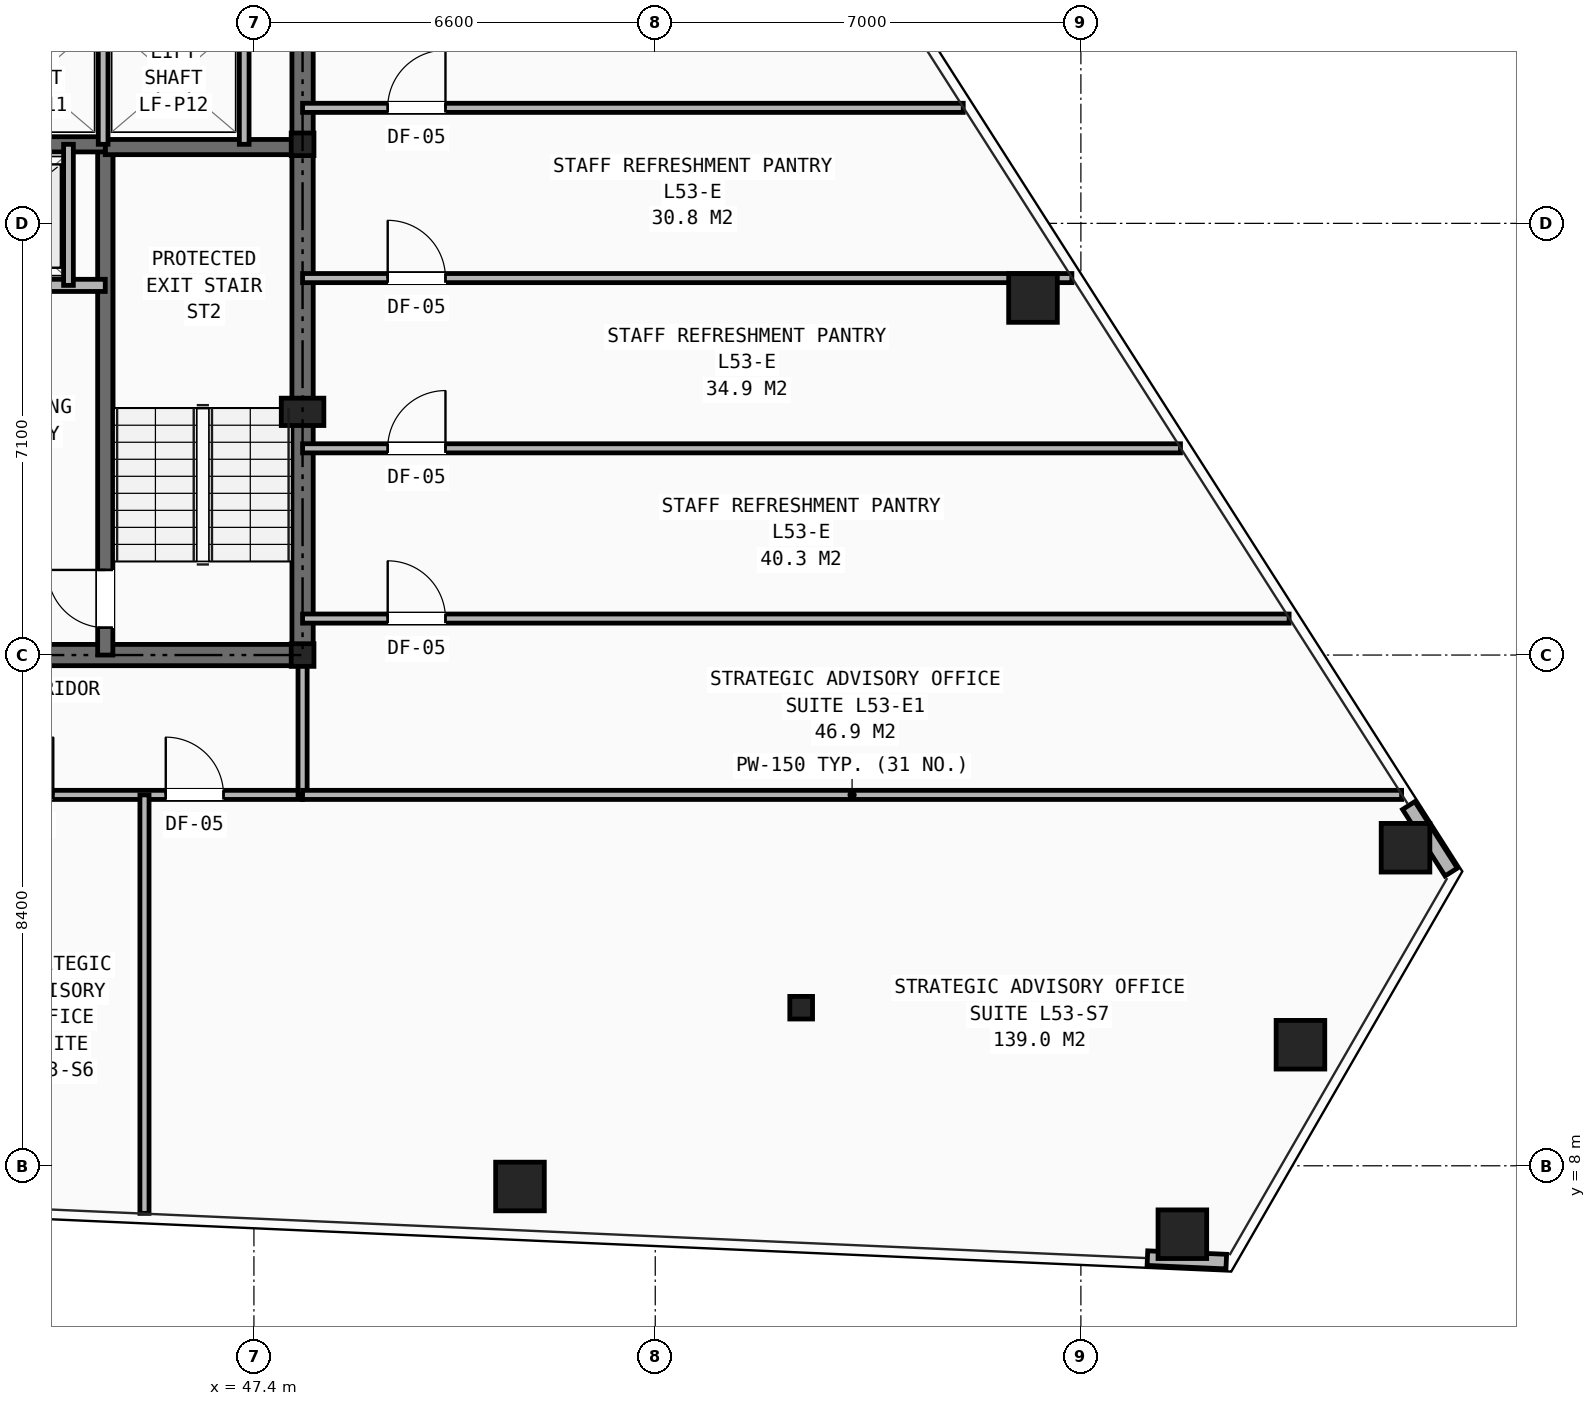
"""IFC4 building model, lengths in metres.
Left out: names, types, materials, properties, quantities, classifications, styles, units other than length and angle.
Written with IfcOpenShell. Run it as: python <this file> out.ifc"""

import sys

from ifc_helpers import new_model, si_unit, direction, frame, frame_2d, origin, origin_2d, place, context, subcontext, project, spatial, rectangle, hollow_rectangle, i_section, extrude, element, fill, save


model = new_model("IFC4")
c1 = context("Model", 3, precision=1e-05, world=origin(), true_north=direction((0.0, 1.0)))
c2 = subcontext(c1, "Body", "Model", "MODEL_VIEW")
j1 = project(units=[si_unit("LENGTHUNIT", "METRE"), si_unit("PLANEANGLEUNIT", "RADIAN")], contexts=[c1])
p1 = place(None, origin())
s1 = spatial("IfcSite", under=j1, at=p1, CompositionType="ELEMENT")
p2 = place(p1, origin())
s2 = spatial("IfcBuilding", under=s1, at=p2, CompositionType="ELEMENT")
p3 = place(p2, frame((0.0, 0.0, 186.15)))
s3 = spatial("IfcBuildingStorey", under=s2, at=p3, CompositionType="ELEMENT", Elevation=186.15)
for number, where, z_axis, x_axis in (
    (1, (48.2, 16.4, 0.0), (0.0, 0.0, 1.0), (1.0, 0.0, 0.0)),
    (2, (48.2, 24.8, 0.0), (0.0, 0.0, 1.0), (1.0, 0.0, 0.0)),
    (3, (56.4, 10.6, 0.0), (0.0, 0.0, 1.0), (1.0, 0.0, 0.0)),
):
    element("IfcColumn", number, at=place(p3, frame(where, z_axis=z_axis, x_axis=x_axis)), inside=s3, PredefinedType="COLUMN", context=c2, shape_type="SweptSolid", body=[
        extrude(i_section(OverallWidth=0.374, OverallDepth=0.372, WebThickness=0.016, FlangeThickness=0.026, at=origin_2d()), origin(), (0.0, 0.0, 1.0), 3.45),
    ])
p4 = place(p3, frame((48.2, 20.4, 0.0), z_axis=(0.0, 0.0, 1.0), x_axis=(1.0, 0.0, 0.0)))
e4 = element("IfcColumn", 4, at=p4, inside=s3, PredefinedType="PILASTER", context=c2, shape_type="SweptSolid", body=[
    extrude(rectangle(XDim=0.7, YDim=0.45, at=origin_2d()), origin(), (0.0, 0.0, 1.0), 3.45),
])
for number, where, z_axis, x_axis in (
    (5, (51.775, 7.659, 0.0), (0.0, 0.0, 1.0), (1.0, 0.0, 0.0)),
    (6, (62.669, 6.875, 0.0), (0.0, 0.0, 1.0), (1.0, 0.0, 0.0)),
    (7, (64.611, 9.991, 0.0), (0.0, 0.0, 1.0), (1.0, 0.0, 0.0)),
    (8, (66.339, 13.231, 0.0), (0.0, 0.0, 1.0), (1.0, 0.0, 0.0)),
    (9, (60.212, 22.272, 0.0), (0.0, 0.0, 1.0), (1.0, 0.0, 0.0)),
):
    element("IfcColumn", number, at=place(p3, frame(where, z_axis=z_axis, x_axis=x_axis)), inside=s3, PredefinedType="COLUMN", context=c2, shape_type="SweptSolid", body=[
        extrude(hollow_rectangle(XDim=0.8, YDim=0.8, WallThickness=0.055, at=origin_2d()), origin(), (0.0, 0.0, 1.0), 3.45),
    ])
for number, where, z_axis, x_axis in (
    (10, (62.094, 6.481, 0.0), (0.0, 0.0, 1.0), (0.999, -0.044, 0.0)),
    (11, (67.09, 12.831, 0.0), (0.0, 0.0, 1.0), (-0.538, 0.843, 0.0)),
):
    element("IfcWall", number, at=place(p3, frame(where, z_axis=z_axis, x_axis=x_axis)), inside=s3, PredefinedType="SHEAR", context=c2, shape_type="SweptSolid", body=[
        extrude(rectangle(XDim=1.298, YDim=0.24, at=frame_2d((0.649, 0.0))), origin(), (0.0, 0.0, 1.0), 2.583),
    ])
p5 = place(p3, frame((31.8, 16.4, 0.0), z_axis=(0.0, 0.0, 1.0), x_axis=(1.0, 0.0, 0.0)))
e12 = element("IfcWall", 12, at=p5, inside=s3, PredefinedType="SHEAR", context=c2, shape_type="SweptSolid", body=[
    extrude(rectangle(XDim=16.4, YDim=0.35, at=frame_2d((8.2, 0.0))), origin(), (0.0, 0.0, 1.0), 3.21),
])
p6 = place(p5, frame((7.75, 0.0, 0.0)))
e13 = element("IfcOpeningElement", 13, at=p6, cuts=e12, PredefinedType="OPENING", context=c2, shape_type="SweptSolid", body=[
    extrude(rectangle(XDim=0.9, YDim=2.1, at=frame_2d((0.45, 1.05))), frame((0.0, 0.185, 0.0), z_axis=(0.0, -1.0, 0.0), x_axis=(1.0, 0.0, 0.0)), (0.0, 0.0, 1.0), 0.37),
])
p7 = place(p5, frame((4.2, 0.0, 0.0)))
e14 = element("IfcOpeningElement", 14, at=p7, cuts=e12, PredefinedType="OPENING", context=c2, shape_type="SweptSolid", body=[
    extrude(rectangle(XDim=0.95, YDim=2.1, at=frame_2d((0.475, 1.05))), frame((0.0, 0.185, 0.0), z_axis=(0.0, -1.0, 0.0), x_axis=(1.0, 0.0, 0.0)), (0.0, 0.0, 1.0), 0.37),
])
p8 = place(p5, frame((10.6, 0.0, 0.0)))
e15 = element("IfcOpeningElement", 15, at=p8, cuts=e12, PredefinedType="OPENING", context=c2, shape_type="SweptSolid", body=[
    extrude(rectangle(XDim=0.95, YDim=2.1, at=frame_2d((0.475, 1.05))), frame((0.0, 0.185, 0.0), z_axis=(0.0, -1.0, 0.0), x_axis=(1.0, 0.0, 0.0)), (0.0, 0.0, 1.0), 0.37),
])
p9 = place(p3, frame((48.2, 16.4, 0.0), z_axis=(0.0, 0.0, 1.0), x_axis=(0.0, 1.0, 0.0)))
e16 = element("IfcWall", 16, at=p9, inside=s3, PredefinedType="SHEAR", context=c2, shape_type="SweptSolid", body=[
    extrude(rectangle(XDim=14.8, YDim=0.35, at=frame_2d((7.4, 0.0))), origin(), (0.0, 0.0, 1.0), 3.21),
])
p10 = place(p9, frame((11.0, 0.0, 0.0)))
e17 = element("IfcOpeningElement", 17, at=p10, cuts=e16, PredefinedType="OPENING", context=c2, shape_type="SweptSolid", body=[
    extrude(rectangle(XDim=1.1, YDim=2.15, at=frame_2d((0.55, 1.075))), frame((0.0, 0.185, 0.0), z_axis=(0.0, -1.0, 0.0), x_axis=(1.0, 0.0, 0.0)), (0.0, 0.0, 1.0), 0.37),
])
p11 = place(p3, frame((44.955, 16.4, 0.0), z_axis=(0.0, 0.0, 1.0), x_axis=(0.0, 1.0, 0.0)))
e18 = element("IfcWall", 18, at=p11, inside=s3, PredefinedType="SHEAR", context=c2, shape_type="SweptSolid", body=[
    extrude(rectangle(XDim=8.4, YDim=0.25, at=frame_2d((4.2, 0.0))), origin(), (0.0, 0.0, 1.0), 3.21),
])
p12 = place(p11, frame((0.45, 0.0, 0.0)))
e19 = element("IfcOpeningElement", 19, at=p12, cuts=e18, PredefinedType="OPENING", context=c2, shape_type="SweptSolid", body=[
    extrude(rectangle(XDim=0.95, YDim=2.1, at=frame_2d((0.475, 1.05))), frame((0.0, 0.135, 0.0), z_axis=(0.0, -1.0, 0.0), x_axis=(1.0, 0.0, 0.0)), (0.0, 0.0, 1.0), 0.27),
])
p13 = place(p3, frame((44.955, 24.755, 0.0), z_axis=(0.0, 0.0, 1.0), x_axis=(1.0, 0.0, 0.0)))
e20 = element("IfcWall", 20, at=p13, inside=s3, PredefinedType="SHEAR", context=c2, shape_type="SweptSolid", body=[
    extrude(rectangle(XDim=3.245, YDim=0.25, at=frame_2d((1.623, 0.0))), origin(), (0.0, 0.0, 1.0), 3.21),
])
p14 = place(p3, frame((35.045, 24.8, 0.0), z_axis=(0.0, 0.0, 1.0), x_axis=(1.0, 0.0, 0.0)))
e21 = element("IfcWall", 21, at=p14, inside=s3, PredefinedType="SHEAR", context=c2, shape_type="SweptSolid", body=[
    extrude(rectangle(XDim=9.91, YDim=0.25, at=frame_2d((4.955, 0.0))), origin(), (0.0, 0.0, 1.0), 3.21),
])
p15 = place(p3, frame((35.045, 22.48, 0.0), z_axis=(0.0, 0.0, 1.0), x_axis=(1.0, 0.0, 0.0)))
e22 = element("IfcWall", 22, at=p15, inside=s3, PredefinedType="SOLIDWALL", context=c2, shape_type="SweptSolid", body=[
    extrude(rectangle(XDim=9.91, YDim=0.2, at=frame_2d((4.955, 0.0))), origin(), (0.0, 0.0, 1.0), 3.21),
])
p16 = place(p15, frame((1.255, 0.0, 0.0)))
e23 = element("IfcOpeningElement", 23, at=p16, cuts=e22, PredefinedType="OPENING", context=c2, shape_type="SweptSolid", body=[
    extrude(rectangle(XDim=1.1, YDim=2.15, at=frame_2d((0.55, 1.075))), frame((0.0, 0.11, 0.0), z_axis=(0.0, -1.0, 0.0), x_axis=(1.0, 0.0, 0.0)), (0.0, 0.0, 1.0), 0.22),
])
p17 = place(p15, frame((7.555, 0.0, 0.0)))
e24 = element("IfcOpeningElement", 24, at=p17, cuts=e22, PredefinedType="OPENING", context=c2, shape_type="SweptSolid", body=[
    extrude(rectangle(XDim=1.1, YDim=2.15, at=frame_2d((0.55, 1.075))), frame((0.0, 0.11, 0.0), z_axis=(0.0, -1.0, 0.0), x_axis=(1.0, 0.0, 0.0)), (0.0, 0.0, 1.0), 0.22),
])
p18 = place(p15, frame((4.405, 0.0, 0.0)))
e25 = element("IfcOpeningElement", 25, at=p18, cuts=e22, PredefinedType="OPENING", context=c2, shape_type="SweptSolid", body=[
    extrude(rectangle(XDim=1.1, YDim=2.15, at=frame_2d((0.55, 1.075))), frame((0.0, 0.11, 0.0), z_axis=(0.0, -1.0, 0.0), x_axis=(1.0, 0.0, 0.0)), (0.0, 0.0, 1.0), 0.22),
])
p19 = place(p3, frame((44.35, 22.48, 0.0), z_axis=(0.0, 0.0, 1.0), x_axis=(0.0, 1.0, 0.0)))
e26 = element("IfcWall", 26, at=p19, inside=s3, PredefinedType="SOLIDWALL", context=c2, shape_type="SweptSolid", body=[
    extrude(rectangle(XDim=2.32, YDim=0.16, at=frame_2d((1.16, 0.0))), origin(), (0.0, 0.0, 1.0), 3.21),
])
for number, where, z_axis, x_axis in (
    (27, (44.92, 24.8, 0.0), (0.0, 0.0, 1.0), (0.0, 1.0, 0.0)),
    (28, (47.24, 24.8, 0.0), (0.0, 0.0, 1.0), (0.0, 1.0, 0.0)),
):
    element("IfcWall", number, at=place(p3, frame(where, z_axis=z_axis, x_axis=x_axis)), inside=s3, PredefinedType="SOLIDWALL", context=c2, shape_type="SweptSolid", body=[
        extrude(rectangle(XDim=2.08, YDim=0.16, at=frame_2d((1.04, 0.0))), origin(), (0.0, 0.0, 1.0), 3.21),
    ])
p20 = place(p3, frame((29.6, 14.1, 0.0), z_axis=(0.0, 0.0, 1.0), x_axis=(1.0, 0.0, 0.0)))
e29 = element("IfcWall", 29, at=p20, inside=s3, PredefinedType="PARTITIONING", context=c2, shape_type="SweptSolid", body=[
    extrude(rectangle(XDim=18.6, YDim=0.15, at=frame_2d((9.3, 0.0))), origin(), (0.0, 0.0, 1.0), 2.252),
])
p21 = place(p20, frame((0.55, 0.0, 0.0)))
e30 = element("IfcOpeningElement", 30, at=p21, cuts=e29, PredefinedType="OPENING", context=c2, shape_type="SweptSolid", body=[
    extrude(rectangle(XDim=0.95, YDim=2.1, at=frame_2d((0.475, 1.05))), frame((0.0, 0.085, 0.0), z_axis=(0.0, -1.0, 0.0), x_axis=(1.0, 0.0, 0.0)), (0.0, 0.0, 1.0), 0.17),
])
p22 = place(p20, frame((2.35, 0.0, 0.0)))
e31 = element("IfcOpeningElement", 31, at=p22, cuts=e29, PredefinedType="OPENING", context=c2, shape_type="SweptSolid", body=[
    extrude(rectangle(XDim=0.95, YDim=2.1, at=frame_2d((0.475, 1.05))), frame((0.0, 0.085, 0.0), z_axis=(0.0, -1.0, 0.0), x_axis=(1.0, 0.0, 0.0)), (0.0, 0.0, 1.0), 0.17),
])
p23 = place(p20, frame((5.15, 0.0, 0.0)))
e32 = element("IfcOpeningElement", 32, at=p23, cuts=e29, PredefinedType="OPENING", context=c2, shape_type="SweptSolid", body=[
    extrude(rectangle(XDim=0.95, YDim=2.1, at=frame_2d((0.475, 1.05))), frame((0.0, 0.085, 0.0), z_axis=(0.0, -1.0, 0.0), x_axis=(1.0, 0.0, 0.0)), (0.0, 0.0, 1.0), 0.17),
])
p24 = place(p20, frame((7.95, 0.0, 0.0)))
e33 = element("IfcOpeningElement", 33, at=p24, cuts=e29, PredefinedType="OPENING", context=c2, shape_type="SweptSolid", body=[
    extrude(rectangle(XDim=0.95, YDim=2.1, at=frame_2d((0.475, 1.05))), frame((0.0, 0.085, 0.0), z_axis=(0.0, -1.0, 0.0), x_axis=(1.0, 0.0, 0.0)), (0.0, 0.0, 1.0), 0.17),
])
p25 = place(p20, frame((10.75, 0.0, 0.0)))
e34 = element("IfcOpeningElement", 34, at=p25, cuts=e29, PredefinedType="OPENING", context=c2, shape_type="SweptSolid", body=[
    extrude(rectangle(XDim=0.95, YDim=2.1, at=frame_2d((0.475, 1.05))), frame((0.0, 0.085, 0.0), z_axis=(0.0, -1.0, 0.0), x_axis=(1.0, 0.0, 0.0)), (0.0, 0.0, 1.0), 0.17),
])
p26 = place(p20, frame((13.55, 0.0, 0.0)))
e35 = element("IfcOpeningElement", 35, at=p26, cuts=e29, PredefinedType="OPENING", context=c2, shape_type="SweptSolid", body=[
    extrude(rectangle(XDim=0.95, YDim=2.1, at=frame_2d((0.475, 1.05))), frame((0.0, 0.085, 0.0), z_axis=(0.0, -1.0, 0.0), x_axis=(1.0, 0.0, 0.0)), (0.0, 0.0, 1.0), 0.17),
])
p27 = place(p20, frame((16.35, 0.0, 0.0)))
e36 = element("IfcOpeningElement", 36, at=p27, cuts=e29, PredefinedType="OPENING", context=c2, shape_type="SweptSolid", body=[
    extrude(rectangle(XDim=0.95, YDim=2.1, at=frame_2d((0.475, 1.05))), frame((0.0, 0.085, 0.0), z_axis=(0.0, -1.0, 0.0), x_axis=(1.0, 0.0, 0.0)), (0.0, 0.0, 1.0), 0.17),
])
p28 = place(p3, frame((48.2, 14.1, 0.0), z_axis=(0.0, 0.0, 1.0), x_axis=(0.0, 1.0, 0.0)))
e37 = element("IfcWall", 37, at=p28, inside=s3, PredefinedType="PARTITIONING", context=c2, shape_type="SweptSolid", body=[
    extrude(rectangle(XDim=2.3, YDim=0.15, at=frame_2d((1.15, 0.0))), origin(), (0.0, 0.0, 1.0), 2.665),
])
p29 = place(p3, frame((45.6, 7.217, 0.0), z_axis=(0.0, 0.0, 1.0), x_axis=(0.0, 1.0, 0.0)))
e38 = element("IfcWall", 38, at=p29, inside=s3, PredefinedType="PARTITIONING", context=c2, shape_type="SweptSolid", body=[
    extrude(rectangle(XDim=6.883, YDim=0.15, at=frame_2d((3.441, 0.0))), origin(), (0.0, 0.0, 1.0), 2.589),
])
p30 = place(p3, frame((48.2, 14.1, 0.0), z_axis=(0.0, 0.0, 1.0), x_axis=(1.0, 0.0, 0.0)))
e39 = element("IfcWall", 39, at=p30, inside=s3, PredefinedType="PARTITIONING", context=c2, shape_type="SweptSolid", body=[
    extrude(rectangle(XDim=18.074, YDim=0.15, at=frame_2d((9.037, 0.0))), origin(), (0.0, 0.0, 1.0), 2.589),
])
p31 = place(p3, frame((48.2, 17.0, 0.0), z_axis=(0.0, 0.0, 1.0), x_axis=(1.0, 0.0, 0.0)))
e40 = element("IfcWall", 40, at=p31, inside=s3, PredefinedType="PARTITIONING", context=c2, shape_type="SweptSolid", body=[
    extrude(rectangle(XDim=16.224, YDim=0.15, at=frame_2d((8.112, 0.0))), origin(), (0.0, 0.0, 1.0), 2.589),
])
p32 = place(p31, frame((1.4, 0.0, 0.0)))
e41 = element("IfcOpeningElement", 41, at=p32, cuts=e40, PredefinedType="OPENING", context=c2, shape_type="SweptSolid", body=[
    extrude(rectangle(XDim=0.95, YDim=2.1, at=frame_2d((0.475, 1.05))), frame((0.0, 0.085, 0.0), z_axis=(0.0, -1.0, 0.0), x_axis=(1.0, 0.0, 0.0)), (0.0, 0.0, 1.0), 0.17),
])
p33 = place(p3, frame((48.2, 19.8, 0.0), z_axis=(0.0, 0.0, 1.0), x_axis=(1.0, 0.0, 0.0)))
e42 = element("IfcWall", 42, at=p33, inside=s3, PredefinedType="PARTITIONING", context=c2, shape_type="SweptSolid", body=[
    extrude(rectangle(XDim=14.438, YDim=0.15, at=frame_2d((7.219, 0.0))), origin(), (0.0, 0.0, 1.0), 2.589),
])
p34 = place(p33, frame((1.4, 0.0, 0.0)))
e43 = element("IfcOpeningElement", 43, at=p34, cuts=e42, PredefinedType="OPENING", context=c2, shape_type="SweptSolid", body=[
    extrude(rectangle(XDim=0.95, YDim=2.1, at=frame_2d((0.475, 1.05))), frame((0.0, 0.085, 0.0), z_axis=(0.0, -1.0, 0.0), x_axis=(1.0, 0.0, 0.0)), (0.0, 0.0, 1.0), 0.17),
])
p35 = place(p3, frame((48.2, 22.6, 0.0), z_axis=(0.0, 0.0, 1.0), x_axis=(1.0, 0.0, 0.0)))
e44 = element("IfcWall", 44, at=p35, inside=s3, PredefinedType="PARTITIONING", context=c2, shape_type="SweptSolid", body=[
    extrude(rectangle(XDim=12.652, YDim=0.15, at=frame_2d((6.326, 0.0))), origin(), (0.0, 0.0, 1.0), 2.589),
])
p36 = place(p35, frame((1.4, 0.0, 0.0)))
e45 = element("IfcOpeningElement", 45, at=p36, cuts=e44, PredefinedType="OPENING", context=c2, shape_type="SweptSolid", body=[
    extrude(rectangle(XDim=0.95, YDim=2.1, at=frame_2d((0.475, 1.05))), frame((0.0, 0.085, 0.0), z_axis=(0.0, -1.0, 0.0), x_axis=(1.0, 0.0, 0.0)), (0.0, 0.0, 1.0), 0.17),
])
p37 = place(p3, frame((48.2, 25.4, 0.0), z_axis=(0.0, 0.0, 1.0), x_axis=(1.0, 0.0, 0.0)))
e46 = element("IfcWall", 46, at=p37, inside=s3, PredefinedType="PARTITIONING", context=c2, shape_type="SweptSolid", body=[
    extrude(rectangle(XDim=10.865, YDim=0.15, at=frame_2d((5.433, 0.0))), origin(), (0.0, 0.0, 1.0), 2.589),
])
p38 = place(p37, frame((1.4, 0.0, 0.0)))
e47 = element("IfcOpeningElement", 47, at=p38, cuts=e46, PredefinedType="OPENING", context=c2, shape_type="SweptSolid", body=[
    extrude(rectangle(XDim=0.95, YDim=2.1, at=frame_2d((0.475, 1.05))), frame((0.0, 0.085, 0.0), z_axis=(0.0, -1.0, 0.0), x_axis=(1.0, 0.0, 0.0)), (0.0, 0.0, 1.0), 0.17),
])
p39 = place(p12, origin())
e48 = element("IfcDoor", 48, at=p39, inside=s3, OperationType="SINGLE_SWING_RIGHT", PredefinedType="DOOR", context=c2, shape_type="SweptSolid", body=[
    extrude(rectangle(XDim=0.95, YDim=2.1, at=frame_2d((0.475, 1.05))), frame((0.0, 0.025, 0.0), z_axis=(0.0, -1.0, 0.0), x_axis=(1.0, 0.0, 0.0)), (0.0, 0.0, 1.0), 0.05),
])
fill(e19, e48)
p40 = place(p26, origin())
e49 = element("IfcDoor", 49, at=p40, inside=s3, OperationType="SINGLE_SWING_RIGHT", PredefinedType="DOOR", context=c2, shape_type="SweptSolid", body=[
    extrude(rectangle(XDim=0.95, YDim=2.1, at=frame_2d((0.475, 1.05))), frame((0.0, 0.025, 0.0), z_axis=(0.0, -1.0, 0.0), x_axis=(1.0, 0.0, 0.0)), (0.0, 0.0, 1.0), 0.05),
])
fill(e35, e49)
p41 = place(p27, origin())
e50 = element("IfcDoor", 50, at=p41, inside=s3, OperationType="SINGLE_SWING_LEFT", PredefinedType="DOOR", context=c2, shape_type="SweptSolid", body=[
    extrude(rectangle(XDim=0.95, YDim=2.1, at=frame_2d((0.475, 1.05))), frame((0.0, 0.025, 0.0), z_axis=(0.0, -1.0, 0.0), x_axis=(1.0, 0.0, 0.0)), (0.0, 0.0, 1.0), 0.05),
])
fill(e36, e50)
p42 = place(p32, origin())
e51 = element("IfcDoor", 51, at=p42, inside=s3, OperationType="SINGLE_SWING_LEFT", PredefinedType="DOOR", context=c2, shape_type="SweptSolid", body=[
    extrude(rectangle(XDim=0.95, YDim=2.1, at=frame_2d((0.475, 1.05))), frame((0.0, 0.025, 0.0), z_axis=(0.0, -1.0, 0.0), x_axis=(1.0, 0.0, 0.0)), (0.0, 0.0, 1.0), 0.05),
])
fill(e41, e51)
p43 = place(p34, origin())
e52 = element("IfcDoor", 52, at=p43, inside=s3, OperationType="SINGLE_SWING_RIGHT", PredefinedType="DOOR", context=c2, shape_type="SweptSolid", body=[
    extrude(rectangle(XDim=0.95, YDim=2.1, at=frame_2d((0.475, 1.05))), frame((0.0, 0.025, 0.0), z_axis=(0.0, -1.0, 0.0), x_axis=(1.0, 0.0, 0.0)), (0.0, 0.0, 1.0), 0.05),
])
fill(e43, e52)
p44 = place(p36, origin())
e53 = element("IfcDoor", 53, at=p44, inside=s3, OperationType="SINGLE_SWING_LEFT", PredefinedType="DOOR", context=c2, shape_type="SweptSolid", body=[
    extrude(rectangle(XDim=0.95, YDim=2.1, at=frame_2d((0.475, 1.05))), frame((0.0, 0.025, 0.0), z_axis=(0.0, -1.0, 0.0), x_axis=(1.0, 0.0, 0.0)), (0.0, 0.0, 1.0), 0.05),
])
fill(e45, e53)
p45 = place(p38, origin())
e54 = element("IfcDoor", 54, at=p45, inside=s3, OperationType="SINGLE_SWING_RIGHT", PredefinedType="DOOR", context=c2, shape_type="SweptSolid", body=[
    extrude(rectangle(XDim=0.95, YDim=2.1, at=frame_2d((0.475, 1.05))), frame((0.0, 0.025, 0.0), z_axis=(0.0, -1.0, 0.0), x_axis=(1.0, 0.0, 0.0)), (0.0, 0.0, 1.0), 0.05),
])
fill(e47, e54)
save(model, sys.argv[1])
